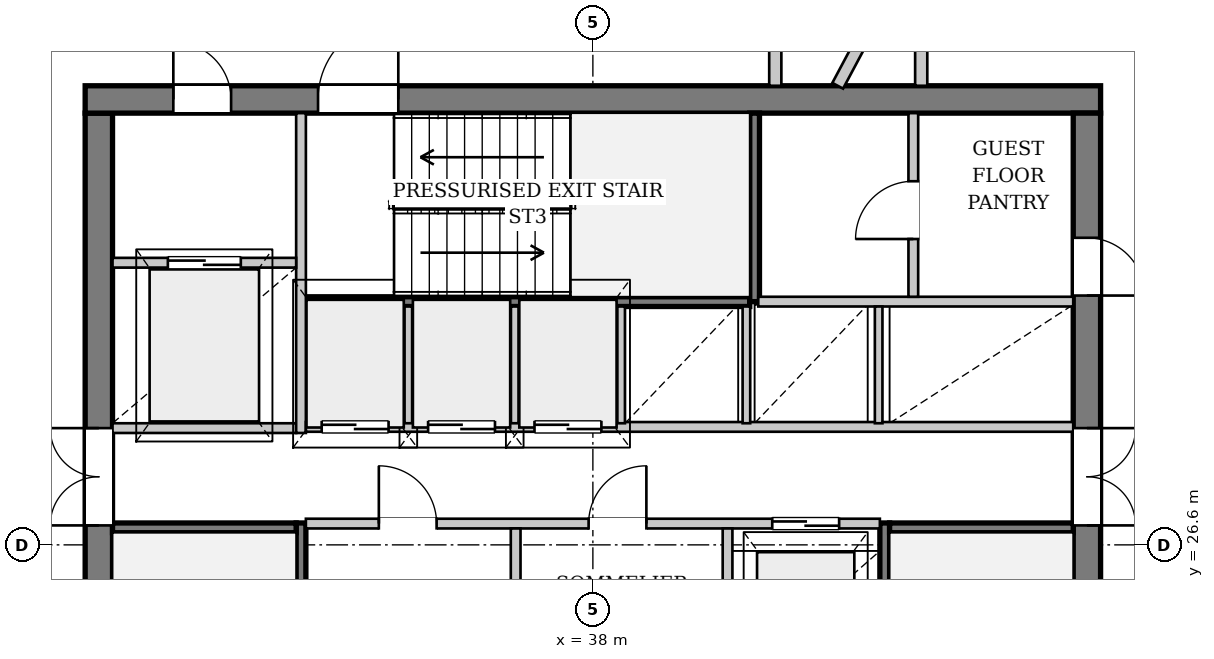
"""IFC4 building model, lengths in metres.
Left out: names, types, materials, properties, quantities, classifications, styles, units other than length and angle.
Written with IfcOpenShell. Run it as: python <this file> out.ifc"""

import sys

from ifc_helpers import new_model, si_unit, direction, frame, frame_2d, origin, place, context, subcontext, project, spatial, rectangle, extrude, source, transform, mapped, element, fill, save


model = new_model("IFC4")
c1 = context("Model", 3, precision=1e-05, world=origin(), true_north=direction((0.0, 1.0)))
c2 = subcontext(c1, "Body", "Model", "MODEL_VIEW")
j1 = project(units=[si_unit("LENGTHUNIT", "METRE"), si_unit("PLANEANGLEUNIT", "RADIAN")], contexts=[c1])
p1 = place(None, origin())
s1 = spatial("IfcSite", under=j1, at=p1, CompositionType="ELEMENT")
p2 = place(p1, origin())
s2 = spatial("IfcBuilding", under=s1, at=p2, CompositionType="ELEMENT")
p3 = place(p2, frame((0.0, 0.0, 252.5)))
s3 = spatial("IfcBuildingStorey", under=s2, at=p3, CompositionType="ELEMENT", Elevation=252.5)
p4 = place(p3, frame((15.575, 28.539, 0.0), z_axis=(0.0, 0.0, 1.0), x_axis=(0.836303758155, 0.5482663806, 0.0)))
e1 = element("IfcWall", 1, at=p4, inside=s3, PredefinedType="SOLIDWALL", context=c2, shape_type="SweptSolid", body=[
    extrude(rectangle(XDim=22.124, YDim=0.38, at=frame_2d((11.062, 0.0))), origin(), (0.0, 0.0, 1.0), 2.872),
])
p5 = place(p4, frame((5.595, 0.0, 0.65)))
e2 = element("IfcOpeningElement", 2, at=p5, cuts=e1, PredefinedType="OPENING", context=c2, shape_type="SweptSolid", body=[
    extrude(rectangle(XDim=1.2, YDim=1.5, at=frame_2d((0.6, 0.75))), frame((0.0, 0.2, 0.0), z_axis=(0.0, -1.0, 0.0), x_axis=(1.0, 0.0, 0.0)), (0.0, 0.0, 1.0), 0.4),
])
p6 = place(p4, frame((16.929, 0.0, 0.65)))
e3 = element("IfcOpeningElement", 3, at=p6, cuts=e1, PredefinedType="OPENING", context=c2, shape_type="SweptSolid", body=[
    extrude(rectangle(XDim=1.2, YDim=1.5, at=frame_2d((0.6, 0.75))), frame((0.0, 0.2, 0.0), z_axis=(0.0, -1.0, 0.0), x_axis=(1.0, 0.0, 0.0)), (0.0, 0.0, 1.0), 0.4),
])
p7 = place(p3, frame((29.875, 19.5, 0.0), z_axis=(0.0, 0.0, 1.0), x_axis=(0.0, 1.0, 0.0)))
e4 = element("IfcWall", 4, at=p7, inside=s3, PredefinedType="SHEAR", context=c2, shape_type="SweptSolid", body=[
    extrude(rectangle(XDim=14.2, YDim=0.45, at=frame_2d((7.1, 0.0))), origin(), (0.0, 0.0, 1.0), 3.38),
])
p8 = place(p7, frame((7.42, 0.0, 0.0)))
e5 = element("IfcOpeningElement", 5, at=p8, cuts=e4, PredefinedType="OPENING", context=c2, shape_type="SweptSolid", body=[
    extrude(rectangle(XDim=1.6, YDim=2.2, at=frame_2d((0.8, 1.1))), frame((0.0, 0.235, 0.0), z_axis=(0.0, -1.0, 0.0), x_axis=(1.0, 0.0, 0.0)), (0.0, 0.0, 1.0), 0.47),
])
p9 = place(p3, frame((29.65, 33.925, 0.0), z_axis=(0.0, 0.0, 1.0), x_axis=(1.0, 0.0, 0.0)))
e6 = element("IfcWall", 6, at=p9, inside=s3, PredefinedType="SHEAR", context=c2, shape_type="SweptSolid", body=[
    extrude(rectangle(XDim=16.7, YDim=0.45, at=frame_2d((8.35, 0.0))), origin(), (0.0, 0.0, 1.0), 3.38),
])
p10 = place(p9, frame((1.45, 0.0, 0.0)))
e7 = element("IfcOpeningElement", 7, at=p10, cuts=e6, PredefinedType="OPENING", context=c2, shape_type="SweptSolid", body=[
    extrude(rectangle(XDim=0.95, YDim=2.1, at=frame_2d((0.475, 1.05))), frame((0.0, 0.235, 0.0), z_axis=(0.0, -1.0, 0.0), x_axis=(1.0, 0.0, 0.0)), (0.0, 0.0, 1.0), 0.47),
])
p11 = place(p9, frame((3.83, 0.0, 0.0)))
e8 = element("IfcOpeningElement", 8, at=p11, cuts=e6, PredefinedType="OPENING", context=c2, shape_type="SweptSolid", body=[
    extrude(rectangle(XDim=1.32, YDim=2.2, at=frame_2d((0.66, 1.1))), frame((0.0, 0.235, 0.0), z_axis=(0.0, -1.0, 0.0), x_axis=(1.0, 0.0, 0.0)), (0.0, 0.0, 1.0), 0.47),
])
p12 = place(p3, frame((46.125, 33.7, 0.0), z_axis=(0.0, 0.0, 1.0), x_axis=(0.0, -1.0, 0.0)))
e9 = element("IfcWall", 9, at=p12, inside=s3, PredefinedType="SHEAR", context=c2, shape_type="SweptSolid", body=[
    extrude(rectangle(XDim=14.2, YDim=0.45, at=frame_2d((7.1, 0.0))), origin(), (0.0, 0.0, 1.0), 3.38),
])
p13 = place(p12, frame((5.18, 0.0, 0.0)))
e10 = element("IfcOpeningElement", 10, at=p13, cuts=e9, PredefinedType="OPENING", context=c2, shape_type="SweptSolid", body=[
    extrude(rectangle(XDim=1.6, YDim=2.2, at=frame_2d((0.8, 1.1))), frame((0.0, 0.235, 0.0), z_axis=(0.0, -1.0, 0.0), x_axis=(1.0, 0.0, 0.0)), (0.0, 0.0, 1.0), 0.47),
])
p14 = place(p12, frame((2.05, 0.0, 0.0)))
e11 = element("IfcOpeningElement", 11, at=p14, cuts=e9, PredefinedType="OPENING", context=c2, shape_type="SweptSolid", body=[
    extrude(rectangle(XDim=0.95, YDim=2.1, at=frame_2d((0.475, 1.05))), frame((0.0, 0.235, 0.0), z_axis=(0.0, -1.0, 0.0), x_axis=(1.0, 0.0, 0.0)), (0.0, 0.0, 1.0), 0.47),
])
p15 = place(p3, frame((33.2, 19.5, 0.0), z_axis=(0.0, 0.0, 1.0), x_axis=(0.0, 1.0, 0.0)))
e12 = element("IfcWall", 12, at=p15, inside=s3, PredefinedType="PARTITIONING", context=c2, shape_type="SweptSolid", body=[
    extrude(rectangle(XDim=7.46, YDim=0.16, at=frame_2d((3.73, 0.0))), origin(), (0.0, 0.0, 1.0), 3.38),
])
p16 = place(p15, frame((0.08, 0.0, 0.0)))
e13 = element("IfcOpeningElement", 13, at=p16, cuts=e12, PredefinedType="OPENING", context=c2, shape_type="SweptSolid", body=[
    extrude(rectangle(XDim=1.32, YDim=2.2, at=frame_2d((0.66, 1.1))), frame((0.0, 0.09, 0.0), z_axis=(0.0, -1.0, 0.0), x_axis=(1.0, 0.0, 0.0)), (0.0, 0.0, 1.0), 0.18),
])
p17 = place(p3, frame((30.1, 26.88, 0.0), z_axis=(0.0, 0.0, 1.0), x_axis=(1.0, 0.0, 0.0)))
e14 = element("IfcWall", 14, at=p17, inside=s3, PredefinedType="PARTITIONING", context=c2, shape_type="SweptSolid", body=[
    extrude(rectangle(XDim=3.02, YDim=0.16, at=frame_2d((1.51, 0.0))), origin(), (0.0, 0.0, 1.0), 3.38),
])
p18 = place(p3, frame((42.8, 26.96, 0.0), z_axis=(0.0, 0.0, 1.0), x_axis=(0.0, -1.0, 0.0)))
e15 = element("IfcWall", 15, at=p18, inside=s3, PredefinedType="PARTITIONING", context=c2, shape_type="SweptSolid", body=[
    extrude(rectangle(XDim=7.46, YDim=0.16, at=frame_2d((3.73, 0.0))), origin(), (0.0, 0.0, 1.0), 3.38),
])
p19 = place(p18, frame((6.06, 0.0, 0.0)))
e16 = element("IfcOpeningElement", 16, at=p19, cuts=e15, PredefinedType="OPENING", context=c2, shape_type="SweptSolid", body=[
    extrude(rectangle(XDim=1.32, YDim=2.2, at=frame_2d((0.66, 1.1))), frame((0.0, 0.09, 0.0), z_axis=(0.0, -1.0, 0.0), x_axis=(1.0, 0.0, 0.0)), (0.0, 0.0, 1.0), 0.18),
])
p20 = place(p3, frame((42.88, 26.88, 0.0), z_axis=(0.0, 0.0, 1.0), x_axis=(1.0, 0.0, 0.0)))
e17 = element("IfcWall", 17, at=p20, inside=s3, PredefinedType="PARTITIONING", context=c2, shape_type="SweptSolid", body=[
    extrude(rectangle(XDim=3.02, YDim=0.16, at=frame_2d((1.51, 0.0))), origin(), (0.0, 0.0, 1.0), 3.38),
])
p21 = place(p3, frame((33.28, 30.6, 0.0), z_axis=(0.0, 0.0, 1.0), x_axis=(1.0, 0.0, 0.0)))
e18 = element("IfcWall", 18, at=p21, inside=s3, PredefinedType="PARTITIONING", context=c2, shape_type="SweptSolid", body=[
    extrude(rectangle(XDim=7.3, YDim=0.16, at=frame_2d((3.65, 0.0))), origin(), (0.0, 0.0, 1.0), 3.38),
])
p22 = place(p3, frame((40.66, 30.6, 0.0), z_axis=(0.0, 0.0, 1.0), x_axis=(0.0, 1.0, 0.0)))
e19 = element("IfcWall", 19, at=p22, inside=s3, PredefinedType="PARTITIONING", context=c2, shape_type="SweptSolid", body=[
    extrude(rectangle(XDim=3.1, YDim=0.16, at=frame_2d((1.55, 0.0))), origin(), (0.0, 0.0, 1.0), 3.38),
])
p23 = place(p3, frame((30.1, 28.52, 0.0), z_axis=(0.0, 0.0, 1.0), x_axis=(1.0, 0.0, 0.0)))
e20 = element("IfcWall", 20, at=p23, inside=s3, PredefinedType="PARTITIONING", context=c2, shape_type="SweptSolid", body=[
    extrude(rectangle(XDim=3.02, YDim=0.16, at=frame_2d((1.51, 0.0))), origin(), (0.0, 0.0, 1.0), 3.38),
])
p24 = place(p3, frame((33.2, 28.44, 0.0), z_axis=(0.0, 0.0, 1.0), x_axis=(0.0, 1.0, 0.0)))
e21 = element("IfcWall", 21, at=p24, inside=s3, PredefinedType="PARTITIONING", context=c2, shape_type="SweptSolid", body=[
    extrude(rectangle(XDim=5.26, YDim=0.16, at=frame_2d((2.63, 0.0))), origin(), (0.0, 0.0, 1.0), 3.38),
])
p25 = place(p3, frame((30.1, 31.24, 0.0), z_axis=(0.0, 0.0, 1.0), x_axis=(1.0, 0.0, 0.0)))
e22 = element("IfcWall", 22, at=p25, inside=s3, PredefinedType="PARTITIONING", context=c2, shape_type="SweptSolid", body=[
    extrude(rectangle(XDim=3.02, YDim=0.16, at=frame_2d((1.51, 0.0))), origin(), (0.0, 0.0, 1.0), 3.38),
])
p26 = place(p25, frame((0.91, 0.0, 0.0)))
e23 = element("IfcOpeningElement", 23, at=p26, cuts=e22, PredefinedType="OPENING", context=c2, shape_type="SweptSolid", body=[
    extrude(rectangle(XDim=1.2, YDim=2.2, at=frame_2d((0.6, 1.1))), frame((0.0, 0.09, 0.0), z_axis=(0.0, -1.0, 0.0), x_axis=(1.0, 0.0, 0.0)), (0.0, 0.0, 1.0), 0.18),
])
p27 = place(p3, frame((33.28, 26.95, 0.0), z_axis=(0.0, 0.0, 1.0), x_axis=(1.0, 0.0, 0.0)))
e24 = element("IfcWall", 24, at=p27, inside=s3, PredefinedType="PARTITIONING", context=c2, shape_type="SweptSolid", body=[
    extrude(rectangle(XDim=9.44, YDim=0.16, at=frame_2d((4.72, 0.0))), origin(), (0.0, 0.0, 1.0), 3.38),
])
p28 = place(p27, frame((1.2, 0.0, 0.0)))
e25 = element("IfcOpeningElement", 25, at=p28, cuts=e24, PredefinedType="OPENING", context=c2, shape_type="SweptSolid", body=[
    extrude(rectangle(XDim=0.95, YDim=2.1, at=frame_2d((0.475, 1.05))), frame((0.0, 0.09, 0.0), z_axis=(0.0, -1.0, 0.0), x_axis=(1.0, 0.0, 0.0)), (0.0, 0.0, 1.0), 0.18),
])
p29 = place(p27, frame((4.65, 0.0, 0.0)))
e26 = element("IfcOpeningElement", 26, at=p29, cuts=e24, PredefinedType="OPENING", context=c2, shape_type="SweptSolid", body=[
    extrude(rectangle(XDim=0.95, YDim=2.1, at=frame_2d((0.475, 1.05))), frame((0.0, 0.09, 0.0), z_axis=(0.0, -1.0, 0.0), x_axis=(1.0, 0.0, 0.0)), (0.0, 0.0, 1.0), 0.18),
])
p30 = place(p27, frame((7.67, 0.0, 0.0)))
e27 = element("IfcOpeningElement", 27, at=p30, cuts=e24, PredefinedType="OPENING", context=c2, shape_type="SweptSolid", body=[
    extrude(rectangle(XDim=1.1, YDim=2.2, at=frame_2d((0.55, 1.1))), frame((0.0, 0.09, 0.0), z_axis=(0.0, -1.0, 0.0), x_axis=(1.0, 0.0, 0.0)), (0.0, 0.0, 1.0), 0.18),
])
for number, where, z_axis, x_axis in (
    (28, (36.73, 24.56, 0.0), (0.0, 0.0, 1.0), (0.0, 1.0, 0.0)),
    (29, (40.215, 24.56, 0.0), (0.0, 0.0, 1.0), (0.0, 1.0, 0.0)),
):
    element("IfcWall", number, at=place(p3, frame(where, z_axis=z_axis, x_axis=x_axis)), inside=s3, PredefinedType="PARTITIONING", context=c2, shape_type="SweptSolid", body=[
        extrude(rectangle(XDim=2.31, YDim=0.16, at=frame_2d((1.155, 0.0))), origin(), (0.0, 0.0, 1.0), 3.38),
    ])
p31 = place(p3, frame((33.28, 28.54, 0.0), z_axis=(0.0, 0.0, 1.0), x_axis=(1.0, 0.0, 0.0)))
e30 = element("IfcWall", 30, at=p31, inside=s3, PredefinedType="PARTITIONING", context=c2, shape_type="SweptSolid", body=[
    extrude(rectangle(XDim=12.62, YDim=0.16, at=frame_2d((6.31, 0.0))), origin(), (0.0, 0.0, 1.0), 3.38),
])
p32 = place(p31, frame((0.26, 0.0, 0.0)))
e31 = element("IfcOpeningElement", 31, at=p32, cuts=e30, PredefinedType="OPENING", context=c2, shape_type="SweptSolid", body=[
    extrude(rectangle(XDim=1.1, YDim=2.2, at=frame_2d((0.55, 1.1))), frame((0.0, 0.09, 0.0), z_axis=(0.0, -1.0, 0.0), x_axis=(1.0, 0.0, 0.0)), (0.0, 0.0, 1.0), 0.18),
])
p33 = place(p31, frame((2.01, 0.0, 0.0)))
e32 = element("IfcOpeningElement", 32, at=p33, cuts=e30, PredefinedType="OPENING", context=c2, shape_type="SweptSolid", body=[
    extrude(rectangle(XDim=1.1, YDim=2.2, at=frame_2d((0.55, 1.1))), frame((0.0, 0.09, 0.0), z_axis=(0.0, -1.0, 0.0), x_axis=(1.0, 0.0, 0.0)), (0.0, 0.0, 1.0), 0.18),
])
p34 = place(p31, frame((3.76, 0.0, 0.0)))
e33 = element("IfcOpeningElement", 33, at=p34, cuts=e30, PredefinedType="OPENING", context=c2, shape_type="SweptSolid", body=[
    extrude(rectangle(XDim=1.1, YDim=2.2, at=frame_2d((0.55, 1.1))), frame((0.0, 0.09, 0.0), z_axis=(0.0, -1.0, 0.0), x_axis=(1.0, 0.0, 0.0)), (0.0, 0.0, 1.0), 0.18),
])
p35 = place(p3, frame((40.72, 30.6, 0.0), z_axis=(0.0, 0.0, 1.0), x_axis=(1.0, 0.0, 0.0)))
e34 = element("IfcWall", 34, at=p35, inside=s3, PredefinedType="PARTITIONING", context=c2, shape_type="SweptSolid", body=[
    extrude(rectangle(XDim=5.18, YDim=0.16, at=frame_2d((2.59, 0.0))), origin(), (0.0, 0.0, 1.0), 3.38),
])
for number, where, z_axis, x_axis in (
    (35, (34.965, 28.6, 0.0), (0.0, 0.0, 1.0), (0.0, 1.0, 0.0)),
    (36, (36.715, 28.6, 0.0), (0.0, 0.0, 1.0), (0.0, 1.0, 0.0)),
    (37, (38.465, 28.6, 0.0), (0.0, 0.0, 1.0), (0.0, 1.0, 0.0)),
    (38, (40.525, 28.6, 0.0), (0.0, 0.0, 1.0), (0.0, 1.0, 0.0)),
    (39, (42.7, 28.6, 0.0), (0.0, 0.0, 1.0), (0.0, 1.0, 0.0)),
):
    element("IfcWall", number, at=place(p3, frame(where, z_axis=z_axis, x_axis=x_axis)), inside=s3, PredefinedType="PARTITIONING", context=c2, shape_type="SweptSolid", body=[
        extrude(rectangle(XDim=1.92, YDim=0.125, at=frame_2d((0.96, 0.0))), origin(), (0.0, 0.0, 1.0), 3.38),
    ])
p36 = place(p3, frame((43.27, 30.68, 0.0), z_axis=(0.0, 0.0, 1.0), x_axis=(0.0, 1.0, 0.0)))
e40 = element("IfcWall", 40, at=p36, inside=s3, PredefinedType="PARTITIONING", context=c2, shape_type="SweptSolid", body=[
    extrude(rectangle(XDim=3.02, YDim=0.16, at=frame_2d((1.51, 0.0))), origin(), (0.0, 0.0, 1.0), 3.38),
])
p37 = place(p36, frame((0.95, 0.0, 0.0)))
e41 = element("IfcOpeningElement", 41, at=p37, cuts=e40, PredefinedType="OPENING", context=c2, shape_type="SweptSolid", body=[
    extrude(rectangle(XDim=0.95, YDim=2.1, at=frame_2d((0.475, 1.05))), frame((0.0, 0.09, 0.0), z_axis=(0.0, -1.0, 0.0), x_axis=(1.0, 0.0, 0.0)), (0.0, 0.0, 1.0), 0.18),
])
p38 = place(p3, frame((42.027, 34.15, 0.0), z_axis=(0.0, 0.0, 1.0), x_axis=(0.47056606421, 0.882364765397, 0.0)))
e42 = element("IfcWall", 42, at=p38, inside=s3, PredefinedType="PARTITIONING", context=c2, shape_type="SweptSolid", body=[
    extrude(rectangle(XDim=14.86, YDim=0.2, at=frame_2d((7.43, 0.0))), origin(), (0.0, 0.0, 1.0), 3.38),
])
for number, where, z_axis, x_axis in (
    (43, (41.0, 34.15, 0.0), (0.0, 0.0, 1.0), (0.0, 1.0, 0.0)),
    (44, (43.4, 34.15, 0.0), (0.0, 0.0, 1.0), (0.0, 1.0, 0.0)),
):
    element("IfcWall", number, at=place(p3, frame(where, z_axis=z_axis, x_axis=x_axis)), inside=s3, PredefinedType="PARTITIONING", context=c2, shape_type="SweptSolid", body=[
        extrude(rectangle(XDim=1.85, YDim=0.2, at=frame_2d((0.925, 0.0))), origin(), (0.0, 0.0, 1.0), 3.38),
    ])
m1 = source(origin(), c2, "Body", "SweptSolid", [
    extrude(rectangle(XDim=1.6, YDim=2.2, at=frame_2d((0.8, 1.1))), frame((0.0, 0.025, 0.0), z_axis=(0.0, -1.0, 0.0), x_axis=(1.0, 0.0, 0.0)), (0.0, 0.0, 1.0), 0.05),
])
p39 = place(p8, origin())
e45 = element("IfcDoor", 45, at=p39, inside=s3, OperationType="DOUBLE_DOOR_SINGLE_SWING", PredefinedType="DOOR", context=c2, shape_type="MappedRepresentation", body=[
    mapped(m1, transform((0.0, 0.0, 0.0), x_axis=(1.0, 0.0, 0.0), y_axis=(0.0, 1.0, 0.0), z_axis=(0.0, 0.0, 1.0), scale=1.0)),
])
fill(e5, e45)
m2 = source(origin(), c2, "Body", "SweptSolid", [
    extrude(rectangle(XDim=0.95, YDim=2.1, at=frame_2d((0.475, 1.05))), frame((0.0, 0.025, 0.0), z_axis=(0.0, -1.0, 0.0), x_axis=(1.0, 0.0, 0.0)), (0.0, 0.0, 1.0), 0.05),
])
p40 = place(p10, origin())
e46 = element("IfcDoor", 46, at=p40, inside=s3, OperationType="SINGLE_SWING_LEFT", PredefinedType="DOOR", context=c2, shape_type="MappedRepresentation", body=[
    mapped(m2, transform((0.0, 0.0, 0.0), x_axis=(1.0, 0.0, 0.0), y_axis=(0.0, 1.0, 0.0), z_axis=(0.0, 0.0, 1.0), scale=1.0)),
])
fill(e7, e46)
m3 = source(origin(), c2, "Body", "SweptSolid", [
    extrude(rectangle(XDim=1.32, YDim=2.2, at=frame_2d((0.66, 1.1))), frame((0.0, 0.025, 0.0), z_axis=(0.0, -1.0, 0.0), x_axis=(1.0, 0.0, 0.0)), (0.0, 0.0, 1.0), 0.05),
])
p41 = place(p11, origin())
e47 = element("IfcDoor", 47, at=p41, inside=s3, OperationType="SINGLE_SWING_RIGHT", PredefinedType="DOOR", context=c2, shape_type="MappedRepresentation", body=[
    mapped(m3, transform((0.0, 0.0, 0.0), x_axis=(1.0, 0.0, 0.0), y_axis=(0.0, 1.0, 0.0), z_axis=(0.0, 0.0, 1.0), scale=1.0)),
])
fill(e8, e47)
p42 = place(p13, origin())
e48 = element("IfcDoor", 48, at=p42, inside=s3, OperationType="DOUBLE_DOOR_SINGLE_SWING", PredefinedType="DOOR", context=c2, shape_type="MappedRepresentation", body=[
    mapped(m1, transform((0.0, 0.0, 0.0), x_axis=(1.0, 0.0, 0.0), y_axis=(0.0, 1.0, 0.0), z_axis=(0.0, 0.0, 1.0), scale=1.0)),
])
fill(e10, e48)
m4 = source(origin(), c2, "Body", "SweptSolid", [
    extrude(rectangle(XDim=1.2, YDim=2.2, at=frame_2d((0.6, 1.1))), frame((0.0, 0.025, 0.0), z_axis=(0.0, -1.0, 0.0), x_axis=(1.0, 0.0, 0.0)), (0.0, 0.0, 1.0), 0.05),
])
p43 = place(p26, origin())
e49 = element("IfcDoor", 49, at=p43, inside=s3, OperationType="DOUBLE_DOOR_SLIDING", PredefinedType="DOOR", context=c2, shape_type="MappedRepresentation", body=[
    mapped(m4, transform((0.0, 0.0, 0.0), x_axis=(1.0, 0.0, 0.0), y_axis=(0.0, 1.0, 0.0), z_axis=(0.0, 0.0, 1.0), scale=1.0)),
])
fill(e23, e49)
p44 = place(p28, origin())
e50 = element("IfcDoor", 50, at=p44, inside=s3, OperationType="SINGLE_SWING_LEFT", PredefinedType="DOOR", context=c2, shape_type="MappedRepresentation", body=[
    mapped(m2, transform((0.0, 0.0, 0.0), x_axis=(1.0, 0.0, 0.0), y_axis=(0.0, 1.0, 0.0), z_axis=(0.0, 0.0, 1.0), scale=1.0)),
])
fill(e25, e50)
p45 = place(p29, origin())
e51 = element("IfcDoor", 51, at=p45, inside=s3, OperationType="SINGLE_SWING_RIGHT", PredefinedType="DOOR", context=c2, shape_type="MappedRepresentation", body=[
    mapped(m2, transform((0.0, 0.0, 0.0), x_axis=(1.0, 0.0, 0.0), y_axis=(0.0, 1.0, 0.0), z_axis=(0.0, 0.0, 1.0), scale=1.0)),
])
fill(e26, e51)
m5 = source(origin(), c2, "Body", "SweptSolid", [
    extrude(rectangle(XDim=1.1, YDim=2.2, at=frame_2d((0.55, 1.1))), frame((0.0, 0.025, 0.0), z_axis=(0.0, -1.0, 0.0), x_axis=(1.0, 0.0, 0.0)), (0.0, 0.0, 1.0), 0.05),
])
p46 = place(p30, origin())
e52 = element("IfcDoor", 52, at=p46, inside=s3, OperationType="DOUBLE_DOOR_SLIDING", PredefinedType="DOOR", context=c2, shape_type="MappedRepresentation", body=[
    mapped(m5, transform((0.0, 0.0, 0.0), x_axis=(1.0, 0.0, 0.0), y_axis=(0.0, 1.0, 0.0), z_axis=(0.0, 0.0, 1.0), scale=1.0)),
])
fill(e27, e52)
p47 = place(p32, origin())
e53 = element("IfcDoor", 53, at=p47, inside=s3, OperationType="DOUBLE_DOOR_SLIDING", PredefinedType="DOOR", context=c2, shape_type="MappedRepresentation", body=[
    mapped(m5, transform((0.0, 0.0, 0.0), x_axis=(1.0, 0.0, 0.0), y_axis=(0.0, 1.0, 0.0), z_axis=(0.0, 0.0, 1.0), scale=1.0)),
])
fill(e31, e53)
p48 = place(p33, origin())
e54 = element("IfcDoor", 54, at=p48, inside=s3, OperationType="DOUBLE_DOOR_SLIDING", PredefinedType="DOOR", context=c2, shape_type="MappedRepresentation", body=[
    mapped(m5, transform((0.0, 0.0, 0.0), x_axis=(1.0, 0.0, 0.0), y_axis=(0.0, 1.0, 0.0), z_axis=(0.0, 0.0, 1.0), scale=1.0)),
])
fill(e32, e54)
p49 = place(p34, origin())
e55 = element("IfcDoor", 55, at=p49, inside=s3, OperationType="DOUBLE_DOOR_SLIDING", PredefinedType="DOOR", context=c2, shape_type="MappedRepresentation", body=[
    mapped(m5, transform((0.0, 0.0, 0.0), x_axis=(1.0, 0.0, 0.0), y_axis=(0.0, 1.0, 0.0), z_axis=(0.0, 0.0, 1.0), scale=1.0)),
])
fill(e33, e55)
p50 = place(p37, origin())
e56 = element("IfcDoor", 56, at=p50, inside=s3, OperationType="SINGLE_SWING_LEFT", PredefinedType="DOOR", context=c2, shape_type="MappedRepresentation", body=[
    mapped(m2, transform((0.0, 0.0, 0.0), x_axis=(1.0, 0.0, 0.0), y_axis=(0.0, 1.0, 0.0), z_axis=(0.0, 0.0, 1.0), scale=1.0)),
])
fill(e41, e56)
p51 = place(p14, origin())
e57 = element("IfcDoor", 57, at=p51, inside=s3, OperationType="SINGLE_SWING_RIGHT", PredefinedType="DOOR", context=c2, shape_type="MappedRepresentation", body=[
    mapped(m2, transform((0.0, 0.0, 0.0), x_axis=(1.0, 0.0, 0.0), y_axis=(0.0, 1.0, 0.0), z_axis=(0.0, 0.0, 1.0), scale=1.0)),
])
fill(e11, e57)
save(model, sys.argv[1])
